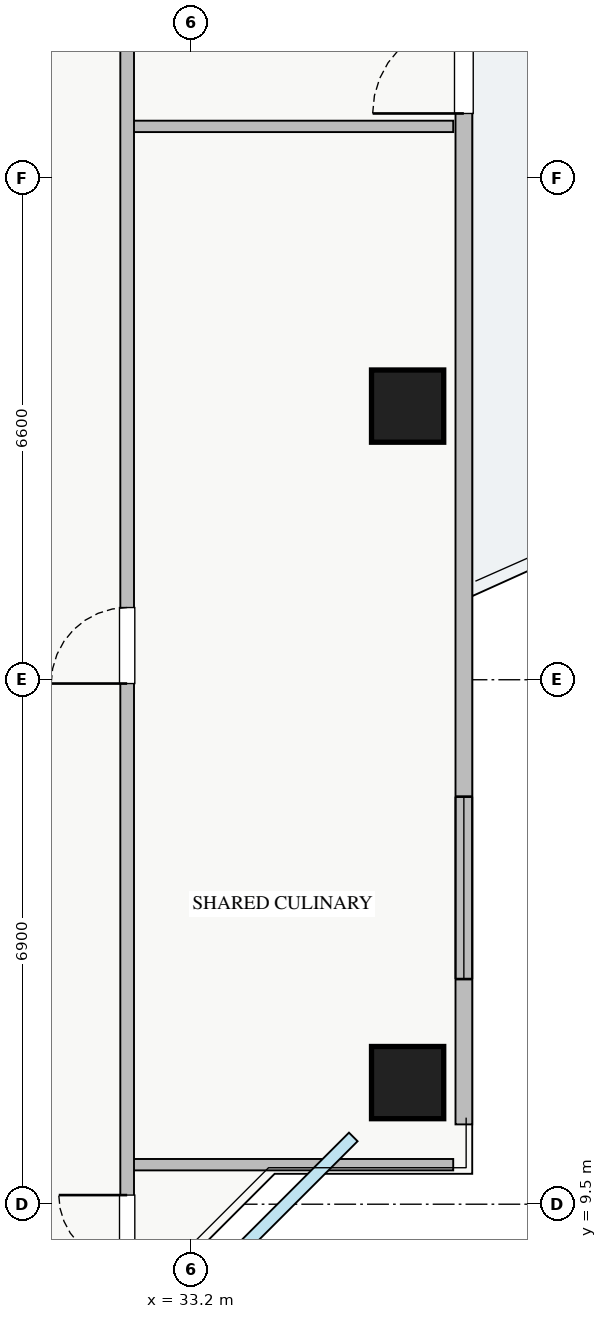
"""IFC4 building model, lengths in metres.
Left out: names, types, materials, properties, quantities, classifications, styles, units other than length and angle.
Written with IfcOpenShell. Run it as: python <this file> out.ifc"""

import sys

from ifc_helpers import new_model, si_unit, direction, frame, frame_2d, origin, origin_2d, place, context, subcontext, project, spatial, rectangle, extrude, source, transform, mapped, element, fill, save


model = new_model("IFC4")
c1 = context("Model", 3, precision=1e-05, world=origin(), true_north=direction((0.0, 1.0)))
c2 = subcontext(c1, "Body", "Model", "MODEL_VIEW")
j1 = project(units=[si_unit("LENGTHUNIT", "METRE"), si_unit("PLANEANGLEUNIT", "RADIAN")], contexts=[c1])
p1 = place(None, origin())
s1 = spatial("IfcSite", under=j1, at=p1, CompositionType="ELEMENT")
p2 = place(p1, origin())
s2 = spatial("IfcBuilding", under=s1, at=p2, CompositionType="ELEMENT")
p3 = place(p2, frame((0.0, 0.0, 147.0)))
s3 = spatial("IfcBuildingStorey", under=s2, at=p3, CompositionType="ELEMENT", Elevation=147.0)
m1 = source(origin(), c2, "Body", "SweptSolid", [
    extrude(rectangle(XDim=0.95, YDim=0.95, at=origin_2d()), origin(), (0.0, 0.0, 1.0), 3.25),
])
for number, where, z_axis, x_axis in (
    (1, (36.05, 11.1, 0.0), (0.0, 0.0, 1.0), (1.0, 0.0, 0.0)),
    (2, (36.05, 20.0, 0.0), (0.0, 0.0, 1.0), (1.0, 0.0, 0.0)),
):
    element("IfcColumn", number, at=place(p3, frame(where, z_axis=z_axis, x_axis=x_axis)), inside=s3, PredefinedType="COLUMN", context=c2, shape_type="MappedRepresentation", body=[
        mapped(m1, transform((0.0, 0.0, 0.0), x_axis=(1.0, 0.0, 0.0), y_axis=(0.0, 1.0, 0.0), z_axis=(0.0, 0.0, 1.0), scale=1.0)),
    ])
p4 = place(p3, frame((36.79, 10.55, 0.0), z_axis=(0.0, 0.0, 1.0), x_axis=(0.0, 1.0, 0.0)))
e3 = element("IfcWall", 3, at=p4, inside=s3, PredefinedType="STANDARD", context=c2, shape_type="SweptSolid", body=[
    extrude(rectangle(XDim=24.9, YDim=0.22, at=frame_2d((12.45, 0.0))), origin(), (0.0, 0.0, 1.0), 2.61),
])
p5 = place(p4, frame((13.3, 0.0, 0.0)))
e4 = element("IfcOpeningElement", 4, at=p5, cuts=e3, PredefinedType="OPENING", context=c2, shape_type="SweptSolid", body=[
    extrude(rectangle(XDim=1.2, YDim=2.1, at=frame_2d((0.6, 1.05))), frame((0.0, 0.12, 0.0), z_axis=(0.0, -1.0, 0.0), x_axis=(1.0, 0.0, 0.0)), (0.0, 0.0, 1.0), 0.24),
])
p6 = place(p4, frame((1.912, 0.0, 0.9)))
e5 = element("IfcOpeningElement", 5, at=p6, cuts=e3, PredefinedType="OPENING", context=c2, shape_type="SweptSolid", body=[
    extrude(rectangle(XDim=2.4, YDim=1.48, at=frame_2d((1.2, 0.74))), frame((0.0, 0.12, 0.0), z_axis=(0.0, -1.0, 0.0), x_axis=(1.0, 0.0, 0.0)), (0.0, 0.0, 1.0), 0.24),
])
p7 = place(p4, frame((20.737, 0.0, 0.9)))
e6 = element("IfcOpeningElement", 6, at=p7, cuts=e3, PredefinedType="OPENING", context=c2, shape_type="SweptSolid", body=[
    extrude(rectangle(XDim=2.1, YDim=1.48, at=frame_2d((1.05, 0.74))), frame((0.0, 0.12, 0.0), z_axis=(0.0, -1.0, 0.0), x_axis=(1.0, 0.0, 0.0)), (0.0, 0.0, 1.0), 0.24),
])
p8 = place(p4, frame((14.72, 0.0, 0.9)))
e7 = element("IfcOpeningElement", 7, at=p8, cuts=e3, PredefinedType="OPENING", context=c2, shape_type="SweptSolid", body=[
    extrude(rectangle(XDim=0.9, YDim=1.2, at=frame_2d((0.45, 0.6))), frame((0.0, 0.12, 0.0), z_axis=(0.0, -1.0, 0.0), x_axis=(1.0, 0.0, 0.0)), (0.0, 0.0, 1.0), 0.24),
])
for number, where, z_axis, x_axis in (
    (8, (32.36, 10.02, 0.0), (0.0, 0.0, 1.0), (1.0, 0.0, 0.0)),
    (9, (32.36, 23.68, 0.0), (0.0, 0.0, 1.0), (1.0, 0.0, 0.0)),
):
    element("IfcWall", number, at=place(p3, frame(where, z_axis=z_axis, x_axis=x_axis)), inside=s3, PredefinedType="PARTITIONING", context=c2, shape_type="SweptSolid", body=[
        extrude(rectangle(XDim=4.29, YDim=0.15, at=frame_2d((2.145, 0.0))), origin(), (0.0, 0.0, 1.0), 3.07),
    ])
p9 = place(p3, frame((32.36, 8.3, 0.0), z_axis=(0.0, 0.0, 1.0), x_axis=(0.0, 1.0, 0.0)))
e10 = element("IfcWall", 10, at=p9, inside=s3, PredefinedType="PARTITIONING", context=c2, shape_type="SweptSolid", body=[
    extrude(rectangle(XDim=29.4, YDim=0.18, at=frame_2d((14.7, 0.0))), origin(), (0.0, 0.0, 1.0), 3.07),
])
p10 = place(p9, frame((28.08, 0.0, 0.0)))
e11 = element("IfcOpeningElement", 11, at=p10, cuts=e10, PredefinedType="OPENING", context=c2, shape_type="SweptSolid", body=[
    extrude(rectangle(XDim=0.9, YDim=2.05, at=frame_2d((0.45, 1.025))), frame((0.0, 0.1, 0.0), z_axis=(0.0, -1.0, 0.0), x_axis=(1.0, 0.0, 0.0)), (0.0, 0.0, 1.0), 0.2),
])
p11 = place(p9, frame((0.42, 0.0, 0.0)))
e12 = element("IfcOpeningElement", 12, at=p11, cuts=e10, PredefinedType="OPENING", context=c2, shape_type="SweptSolid", body=[
    extrude(rectangle(XDim=0.9, YDim=2.05, at=frame_2d((0.45, 1.025))), frame((0.0, 0.1, 0.0), z_axis=(0.0, -1.0, 0.0), x_axis=(1.0, 0.0, 0.0)), (0.0, 0.0, 1.0), 0.2),
])
p12 = place(p9, frame((8.05, 0.0, 0.0)))
e13 = element("IfcOpeningElement", 13, at=p12, cuts=e10, PredefinedType="OPENING", context=c2, shape_type="SweptSolid", body=[
    extrude(rectangle(XDim=1.0, YDim=2.05, at=frame_2d((0.5, 1.025))), frame((0.0, 0.1, 0.0), z_axis=(0.0, -1.0, 0.0), x_axis=(1.0, 0.0, 0.0)), (0.0, 0.0, 1.0), 0.2),
])
p13 = place(p9, frame((18.01, 0.0, 0.0)))
e14 = element("IfcOpeningElement", 14, at=p13, cuts=e10, PredefinedType="OPENING", context=c2, shape_type="SweptSolid", body=[
    extrude(rectangle(XDim=1.0, YDim=2.05, at=frame_2d((0.5, 1.025))), frame((0.0, 0.1, 0.0), z_axis=(0.0, -1.0, 0.0), x_axis=(1.0, 0.0, 0.0)), (0.0, 0.0, 1.0), 0.2),
])
m2 = source(origin(), c2, "Body", "SweptSolid", [
    extrude(rectangle(XDim=1.2, YDim=2.1, at=frame_2d((0.6, 1.05))), frame((0.0, 0.025, 0.0), z_axis=(0.0, -1.0, 0.0), x_axis=(1.0, 0.0, 0.0)), (0.0, 0.0, 1.0), 0.05),
])
p14 = place(p5, origin())
e15 = element("IfcDoor", 15, at=p14, inside=s3, OperationType="SINGLE_SWING_LEFT", PredefinedType="DOOR", context=c2, shape_type="MappedRepresentation", body=[
    mapped(m2, transform((0.0, 0.0, 0.0), x_axis=(1.0, 0.0, 0.0), y_axis=(0.0, 1.0, 0.0), z_axis=(0.0, 0.0, 1.0), scale=1.0)),
])
fill(e4, e15)
m3 = source(origin(), c2, "Body", "SweptSolid", [
    extrude(rectangle(XDim=2.4, YDim=1.48, at=frame_2d((1.2, 0.74))), frame((0.0, 0.03, 0.0), z_axis=(0.0, -1.0, 0.0), x_axis=(1.0, 0.0, 0.0)), (0.0, 0.0, 1.0), 0.06),
])
p15 = place(p6, origin())
e16 = element("IfcWindow", 16, at=p15, inside=s3, PartitioningType="TRIPLE_PANEL_VERTICAL", PredefinedType="WINDOW", context=c2, shape_type="MappedRepresentation", body=[
    mapped(m3, transform((0.0, 0.0, 0.0), x_axis=(1.0, 0.0, 0.0), y_axis=(0.0, 1.0, 0.0), z_axis=(0.0, 0.0, 1.0), scale=1.0)),
])
fill(e5, e16)
m4 = source(origin(), c2, "Body", "SweptSolid", [
    extrude(rectangle(XDim=0.9, YDim=2.05, at=frame_2d((0.45, 1.025))), frame((0.0, 0.025, 0.0), z_axis=(0.0, -1.0, 0.0), x_axis=(1.0, 0.0, 0.0)), (0.0, 0.0, 1.0), 0.05),
])
p16 = place(p11, origin())
e17 = element("IfcDoor", 17, at=p16, inside=s3, OperationType="SINGLE_SWING_RIGHT", PredefinedType="DOOR", context=c2, shape_type="MappedRepresentation", body=[
    mapped(m4, transform((0.0, 0.0, 0.0), x_axis=(1.0, 0.0, 0.0), y_axis=(0.0, 1.0, 0.0), z_axis=(0.0, 0.0, 1.0), scale=1.0)),
])
fill(e12, e17)
m5 = source(origin(), c2, "Body", "SweptSolid", [
    extrude(rectangle(XDim=1.0, YDim=2.05, at=frame_2d((0.5, 1.025))), frame((0.0, 0.025, 0.0), z_axis=(0.0, -1.0, 0.0), x_axis=(1.0, 0.0, 0.0)), (0.0, 0.0, 1.0), 0.05),
])
p17 = place(p12, origin())
e18 = element("IfcDoor", 18, at=p17, inside=s3, OperationType="SINGLE_SWING_LEFT", PredefinedType="DOOR", context=c2, shape_type="MappedRepresentation", body=[
    mapped(m5, transform((0.0, 0.0, 0.0), x_axis=(1.0, 0.0, 0.0), y_axis=(0.0, 1.0, 0.0), z_axis=(0.0, 0.0, 1.0), scale=1.0)),
])
fill(e13, e18)
save(model, sys.argv[1])
